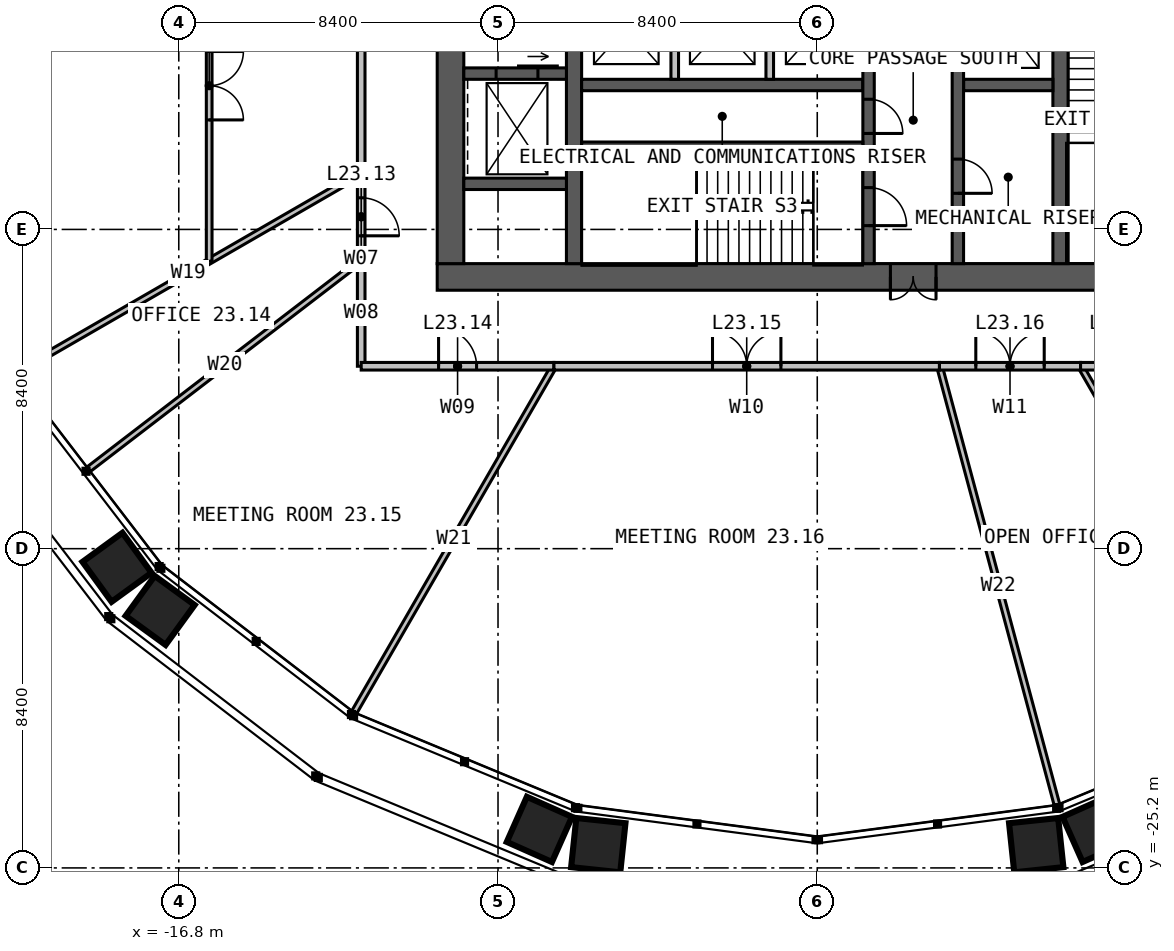
"""IFC4 building model, lengths in metres.
Left out: names, types, materials, properties, quantities, classifications, styles, units other than length and angle.
Written with IfcOpenShell. Run it as: python <this file> out.ifc"""

import sys

from ifc_helpers import new_model, si_unit, direction, frame, frame_2d, origin, place, context, subcontext, project, spatial, rectangle, extrude, element, fill, save


model = new_model("IFC4")
c1 = context("Model", 3, precision=1e-05, world=origin(), true_north=direction((0.0, 1.0)))
c2 = subcontext(c1, "Body", "Model", "MODEL_VIEW")
j1 = project(units=[si_unit("LENGTHUNIT", "METRE"), si_unit("PLANEANGLEUNIT", "RADIAN")], contexts=[c1])
p1 = place(None, origin())
s1 = spatial("IfcSite", under=j1, at=p1, CompositionType="ELEMENT")
p2 = place(p1, origin())
s2 = spatial("IfcBuilding", under=s1, at=p2, CompositionType="ELEMENT")
p3 = place(p2, frame((0.0, 0.0, 98.0)))
s3 = spatial("IfcBuildingStorey", under=s2, at=p3, CompositionType="ELEMENT", Elevation=98.0)
p4 = place(p3, frame((10.0, -9.65, 0.0), z_axis=(0.0, 0.0, 1.0), x_axis=(-1.0, 0.0, 0.0)))
e1 = element("IfcWall", 1, at=p4, inside=s3, PredefinedType="SOLIDWALL", context=c2, shape_type="SweptSolid", body=[
    extrude(rectangle(XDim=20.0, YDim=0.7, at=frame_2d((10.0, 0.0))), origin(), (0.0, 0.0, 1.0), 4.0),
])
p5 = place(p4, frame((6.875, 0.0, 0.0)))
e2 = element("IfcOpeningElement", 2, at=p5, cuts=e1, PredefinedType="OPENING", context=c2, shape_type="SweptSolid", body=[
    extrude(rectangle(XDim=1.2, YDim=2.2, at=frame_2d((0.6, 1.1))), frame((0.0, 0.36, 0.0), z_axis=(0.0, -1.0, 0.0), x_axis=(1.0, 0.0, 0.0)), (0.0, 0.0, 1.0), 0.72),
])
p6 = place(p3, frame((-9.65, 9.3, 0.0), z_axis=(0.0, 0.0, 1.0), x_axis=(0.0, -1.0, 0.0)))
e3 = element("IfcWall", 3, at=p6, inside=s3, PredefinedType="SOLIDWALL", context=c2, shape_type="SweptSolid", body=[
    extrude(rectangle(XDim=18.6, YDim=0.7, at=frame_2d((9.3, 0.0))), origin(), (0.0, 0.0, 1.0), 4.0),
])
p7 = place(p3, frame((-6.4, -9.3, 0.0), z_axis=(0.0, 0.0, 1.0), x_axis=(0.0, 1.0, 0.0)))
e4 = element("IfcWall", 4, at=p7, inside=s3, PredefinedType="SOLIDWALL", context=c2, shape_type="SweptSolid", body=[
    extrude(rectangle(XDim=18.6, YDim=0.4, at=frame_2d((9.3, 0.0))), origin(), (0.0, 0.0, 1.0), 4.0),
])
p8 = place(p7, frame((8.8, 0.0, 0.0)))
e5 = element("IfcOpeningElement", 5, at=p8, cuts=e4, PredefinedType="OPENING", context=c2, shape_type="SweptSolid", body=[
    extrude(rectangle(XDim=1.0, YDim=2.2, at=frame_2d((0.5, 1.1))), frame((0.0, 0.21, 0.0), z_axis=(0.0, -1.0, 0.0), x_axis=(1.0, 0.0, 0.0)), (0.0, 0.0, 1.0), 0.42),
])
p9 = place(p3, frame((6.4, 9.3, 0.0), z_axis=(0.0, 0.0, 1.0), x_axis=(0.0, -1.0, 0.0)))
e6 = element("IfcWall", 6, at=p9, inside=s3, PredefinedType="SOLIDWALL", context=c2, shape_type="SweptSolid", body=[
    extrude(rectangle(XDim=18.6, YDim=0.4, at=frame_2d((9.3, 0.0))), origin(), (0.0, 0.0, 1.0), 4.0),
])
p10 = place(p9, frame((8.8, 0.0, 0.0)))
e7 = element("IfcOpeningElement", 7, at=p10, cuts=e6, PredefinedType="OPENING", context=c2, shape_type="SweptSolid", body=[
    extrude(rectangle(XDim=1.0, YDim=2.2, at=frame_2d((0.5, 1.1))), frame((0.0, 0.21, 0.0), z_axis=(0.0, -1.0, 0.0), x_axis=(1.0, 0.0, 0.0)), (0.0, 0.0, 1.0), 0.42),
])
p11 = place(p3, frame((-6.2, -4.6, 0.0), z_axis=(0.0, 0.0, 1.0), x_axis=(1.0, 0.0, 0.0)))
e8 = element("IfcWall", 8, at=p11, inside=s3, PredefinedType="SOLIDWALL", context=c2, shape_type="SweptSolid", body=[
    extrude(rectangle(XDim=7.4, YDim=0.3, at=frame_2d((3.7, 0.0))), origin(), (0.0, 0.0, 1.0), 4.0),
])
p12 = place(p3, frame((3.85, -4.6, 0.0), z_axis=(0.0, 0.0, 1.0), x_axis=(1.0, 0.0, 0.0)))
e9 = element("IfcWall", 9, at=p12, inside=s3, PredefinedType="SOLIDWALL", context=c2, shape_type="SweptSolid", body=[
    extrude(rectangle(XDim=2.35, YDim=0.3, at=frame_2d((1.175, 0.0))), origin(), (0.0, 0.0, 1.0), 4.0),
])
p13 = place(p3, frame((1.35, -1.45, 0.0), z_axis=(0.0, 0.0, 1.0), x_axis=(0.0, -1.0, 0.0)))
e10 = element("IfcWall", 10, at=p13, inside=s3, PredefinedType="SOLIDWALL", context=c2, shape_type="SweptSolid", body=[
    extrude(rectangle(XDim=7.85, YDim=0.3, at=frame_2d((3.925, 0.0))), origin(), (0.0, 0.0, 1.0), 4.0),
])
p14 = place(p13, frame((5.85, 0.0, 0.0)))
e11 = element("IfcOpeningElement", 11, at=p14, cuts=e10, PredefinedType="OPENING", context=c2, shape_type="SweptSolid", body=[
    extrude(rectangle(XDim=1.0, YDim=2.2, at=frame_2d((0.5, 1.1))), frame((0.0, 0.16, 0.0), z_axis=(0.0, -1.0, 0.0), x_axis=(1.0, 0.0, 0.0)), (0.0, 0.0, 1.0), 0.32),
])
p15 = place(p13, frame((3.525, 0.0, 0.0)))
e12 = element("IfcOpeningElement", 12, at=p15, cuts=e10, PredefinedType="OPENING", context=c2, shape_type="SweptSolid", body=[
    extrude(rectangle(XDim=0.9, YDim=2.2, at=frame_2d((0.45, 1.1))), frame((0.0, 0.16, 0.0), z_axis=(0.0, -1.0, 0.0), x_axis=(1.0, 0.0, 0.0)), (0.0, 0.0, 1.0), 0.32),
])
p16 = place(p3, frame((3.7, -1.45, 0.0), z_axis=(0.0, 0.0, 1.0), x_axis=(0.0, -1.0, 0.0)))
e13 = element("IfcWall", 13, at=p16, inside=s3, PredefinedType="SOLIDWALL", context=c2, shape_type="SweptSolid", body=[
    extrude(rectangle(XDim=7.85, YDim=0.3, at=frame_2d((3.925, 0.0))), origin(), (0.0, 0.0, 1.0), 4.0),
])
p17 = place(p16, frame((5.1, 0.0, 0.0)))
e14 = element("IfcOpeningElement", 14, at=p17, cuts=e13, PredefinedType="OPENING", context=c2, shape_type="SweptSolid", body=[
    extrude(rectangle(XDim=0.9, YDim=2.2, at=frame_2d((0.45, 1.1))), frame((0.0, 0.16, 0.0), z_axis=(0.0, -1.0, 0.0), x_axis=(1.0, 0.0, 0.0)), (0.0, 0.0, 1.0), 0.32),
])
p18 = place(p3, frame((-6.2, -6.2, 0.0), z_axis=(0.0, 0.0, 1.0), x_axis=(1.0, 0.0, 0.0)))
e15 = element("IfcWall", 15, at=p18, inside=s3, PredefinedType="SOLIDWALL", context=c2, shape_type="SweptSolid", body=[
    extrude(rectangle(XDim=7.4, YDim=0.2, at=frame_2d((3.7, 0.0))), origin(), (0.0, 0.0, 1.0), 4.0),
])
p19 = place(p3, frame((-9.3, -4.3, 0.0), z_axis=(0.0, 0.0, 1.0), x_axis=(1.0, 0.0, 0.0)))
e16 = element("IfcWall", 16, at=p19, inside=s3, PredefinedType="SOLIDWALL", context=c2, shape_type="SweptSolid", body=[
    extrude(rectangle(XDim=2.7, YDim=0.3, at=frame_2d((1.35, 0.0))), origin(), (0.0, 0.0, 1.0), 4.0),
])
p20 = place(p19, frame((0.85, 0.0, 0.0)))
e17 = element("IfcOpeningElement", 17, at=p20, cuts=e16, PredefinedType="OPENING", context=c2, shape_type="SweptSolid", body=[
    extrude(rectangle(XDim=1.1, YDim=2.2, at=frame_2d((0.55, 1.1))), frame((0.0, 0.16, 0.0), z_axis=(0.0, -1.0, 0.0), x_axis=(1.0, 0.0, 0.0)), (0.0, 0.0, 1.0), 0.32),
])
p21 = place(p3, frame((-9.3, -7.2, 0.0), z_axis=(0.0, 0.0, 1.0), x_axis=(1.0, 0.0, 0.0)))
e18 = element("IfcWall", 18, at=p21, inside=s3, PredefinedType="SOLIDWALL", context=c2, shape_type="SweptSolid", body=[
    extrude(rectangle(XDim=2.7, YDim=0.3, at=frame_2d((1.35, 0.0))), origin(), (0.0, 0.0, 1.0), 4.0),
])
for number, where, z_axis, x_axis in (
    (19, (-3.75, -1.75, 0.0), (0.0, 0.0, 1.0), (0.0, -1.0, 0.0)),
    (20, (-1.25, -1.75, 0.0), (0.0, 0.0, 1.0), (0.0, -1.0, 0.0)),
):
    element("IfcWall", number, at=place(p3, frame(where, z_axis=z_axis, x_axis=x_axis)), inside=s3, PredefinedType="SOLIDWALL", context=c2, shape_type="SweptSolid", body=[
        extrude(rectangle(XDim=2.7, YDim=0.2, at=frame_2d((1.35, 0.0))), origin(), (0.0, 0.0, 1.0), 3.75),
    ])
p22 = place(p3, frame((-12.0, -6.928, 0.0), z_axis=(0.0, 0.0, 1.0), x_axis=(-0.866028201971, -0.499995153367, 0.0)))
e21 = element("IfcWall", 21, at=p22, inside=s3, PredefinedType="PARTITIONING", context=c2, shape_type="SweptSolid", body=[
    extrude(rectangle(XDim=10.514, YDim=0.15, at=frame_2d((5.257, 0.0))), origin(), (0.0, 0.0, 1.0), 2.79),
])
p23 = place(p3, frame((-12.0, -9.208, 0.0), z_axis=(0.0, 0.0, 1.0), x_axis=(-0.793353631913, -0.60876104896, 0.0)))
e22 = element("IfcWall", 22, at=p23, inside=s3, PredefinedType="PARTITIONING", context=c2, shape_type="SweptSolid", body=[
    extrude(rectangle(XDim=9.036, YDim=0.15, at=frame_2d((4.518, 0.0))), origin(), (0.0, 0.0, 1.0), 2.79),
])
p24 = place(p3, frame((-6.928, -12.0, 0.0), z_axis=(0.0, 0.0, 1.0), x_axis=(-0.499995153367, -0.866028201971, 0.0)))
e23 = element("IfcWall", 23, at=p24, inside=s3, PredefinedType="PARTITIONING", context=c2, shape_type="SweptSolid", body=[
    extrude(rectangle(XDim=10.514, YDim=0.15, at=frame_2d((5.257, 0.0))), origin(), (0.0, 0.0, 1.0), 2.79),
])
p25 = place(p3, frame((3.215, -12.0, 0.0), z_axis=(0.0, 0.0, 1.0), x_axis=(0.258816099716, -0.965926615498, 0.0)))
e24 = element("IfcWall", 24, at=p25, inside=s3, PredefinedType="PARTITIONING", context=c2, shape_type="SweptSolid", body=[
    extrude(rectangle(XDim=11.947, YDim=0.15, at=frame_2d((5.973, 0.0))), origin(), (0.0, 0.0, 1.0), 2.79),
])
p26 = place(p3, frame((6.928, -12.0, 0.0), z_axis=(0.0, 0.0, 1.0), x_axis=(0.499995153367, -0.866028201971, 0.0)))
e25 = element("IfcWall", 25, at=p26, inside=s3, PredefinedType="PARTITIONING", context=c2, shape_type="SweptSolid", body=[
    extrude(rectangle(XDim=10.514, YDim=0.15, at=frame_2d((5.257, 0.0))), origin(), (0.0, 0.0, 1.0), 2.79),
])
p27 = place(p3, frame((-16.0, 9.238, 0.0), z_axis=(0.0, 0.0, 1.0), x_axis=(0.0, -1.0, 0.0)))
e26 = element("IfcWall", 26, at=p27, inside=s3, PredefinedType="PARTITIONING", context=c2, shape_type="SweptSolid", body=[
    extrude(rectangle(XDim=18.475, YDim=0.15, at=frame_2d((9.238, 0.0))), origin(), (0.0, 0.0, 1.0), 2.79),
])
p28 = place(p27, frame((3.066, 0.0, 0.0)))
e27 = element("IfcOpeningElement", 27, at=p28, cuts=e26, PredefinedType="OPENING", context=c2, shape_type="SweptSolid", body=[
    extrude(rectangle(XDim=1.0, YDim=2.2, at=frame_2d((0.5, 1.1))), frame((0.0, 0.085, 0.0), z_axis=(0.0, -1.0, 0.0), x_axis=(1.0, 0.0, 0.0)), (0.0, 0.0, 1.0), 0.17),
])
p29 = place(p27, frame((7.684, 0.0, 0.0)))
e28 = element("IfcOpeningElement", 28, at=p29, cuts=e26, PredefinedType="OPENING", context=c2, shape_type="SweptSolid", body=[
    extrude(rectangle(XDim=1.0, YDim=2.2, at=frame_2d((0.5, 1.1))), frame((0.0, 0.085, 0.0), z_axis=(0.0, -1.0, 0.0), x_axis=(1.0, 0.0, 0.0)), (0.0, 0.0, 1.0), 0.17),
])
p30 = place(p27, frame((12.956, 0.0, 0.0)))
e29 = element("IfcOpeningElement", 29, at=p30, cuts=e26, PredefinedType="OPENING", context=c2, shape_type="SweptSolid", body=[
    extrude(rectangle(XDim=1.8, YDim=2.2, at=frame_2d((0.9, 1.1))), frame((0.0, 0.085, 0.0), z_axis=(0.0, -1.0, 0.0), x_axis=(1.0, 0.0, 0.0)), (0.0, 0.0, 1.0), 0.17),
])
p31 = place(p3, frame((-12.0, 6.928, 0.0), z_axis=(0.0, 0.0, 1.0), x_axis=(0.0, -1.0, 0.0)))
e30 = element("IfcWall", 30, at=p31, inside=s3, PredefinedType="PARTITIONING", context=c2, shape_type="SweptSolid", body=[
    extrude(rectangle(XDim=13.856, YDim=0.2, at=frame_2d((6.928, 0.0))), origin(), (0.0, 0.0, 1.0), 3.8),
])
p32 = place(p31, frame((6.028, 0.0, 0.0)))
e31 = element("IfcOpeningElement", 31, at=p32, cuts=e30, PredefinedType="OPENING", context=c2, shape_type="SweptSolid", body=[
    extrude(rectangle(XDim=1.8, YDim=2.2, at=frame_2d((0.9, 1.1))), frame((0.0, 0.11, 0.0), z_axis=(0.0, -1.0, 0.0), x_axis=(1.0, 0.0, 0.0)), (0.0, 0.0, 1.0), 0.22),
])
p33 = place(p3, frame((-12.0, -6.928, 0.0), z_axis=(0.0, 0.0, 1.0), x_axis=(0.0, -1.0, 0.0)))
e32 = element("IfcWall", 32, at=p33, inside=s3, PredefinedType="PARTITIONING", context=c2, shape_type="SweptSolid", body=[
    extrude(rectangle(XDim=2.28, YDim=0.2, at=frame_2d((1.14, 0.0))), origin(), (0.0, 0.0, 1.0), 3.8),
])
p34 = place(p33, frame((0.64, 0.0, 0.0)))
e33 = element("IfcOpeningElement", 33, at=p34, cuts=e32, PredefinedType="OPENING", context=c2, shape_type="SweptSolid", body=[
    extrude(rectangle(XDim=1.0, YDim=2.2, at=frame_2d((0.5, 1.1))), frame((0.0, 0.11, 0.0), z_axis=(0.0, -1.0, 0.0), x_axis=(1.0, 0.0, 0.0)), (0.0, 0.0, 1.0), 0.22),
])
p35 = place(p3, frame((-12.0, -9.208, 0.0), z_axis=(0.0, 0.0, 1.0), x_axis=(0.0, -1.0, 0.0)))
e34 = element("IfcWall", 34, at=p35, inside=s3, PredefinedType="PARTITIONING", context=c2, shape_type="SweptSolid", body=[
    extrude(rectangle(XDim=2.792, YDim=0.2, at=frame_2d((1.396, 0.0))), origin(), (0.0, 0.0, 1.0), 3.8),
])
p36 = place(p3, frame((-12.0, -12.0, 0.0), z_axis=(0.0, 0.0, 1.0), x_axis=(1.0, 0.0, 0.0)))
e35 = element("IfcWall", 35, at=p36, inside=s3, PredefinedType="PARTITIONING", context=c2, shape_type="SweptSolid", body=[
    extrude(rectangle(XDim=5.072, YDim=0.2, at=frame_2d((2.536, 0.0))), origin(), (0.0, 0.0, 1.0), 3.8),
])
p37 = place(p36, frame((2.036, 0.0, 0.0)))
e36 = element("IfcOpeningElement", 36, at=p37, cuts=e35, PredefinedType="OPENING", context=c2, shape_type="SweptSolid", body=[
    extrude(rectangle(XDim=1.0, YDim=2.2, at=frame_2d((0.5, 1.1))), frame((0.0, 0.11, 0.0), z_axis=(0.0, -1.0, 0.0), x_axis=(1.0, 0.0, 0.0)), (0.0, 0.0, 1.0), 0.22),
])
p38 = place(p3, frame((-6.928, -12.0, 0.0), z_axis=(0.0, 0.0, 1.0), x_axis=(1.0, 0.0, 0.0)))
e37 = element("IfcWall", 37, at=p38, inside=s3, PredefinedType="PARTITIONING", context=c2, shape_type="SweptSolid", body=[
    extrude(rectangle(XDim=10.144, YDim=0.2, at=frame_2d((5.072, 0.0))), origin(), (0.0, 0.0, 1.0), 3.8),
])
p39 = place(p38, frame((4.172, 0.0, 0.0)))
e38 = element("IfcOpeningElement", 38, at=p39, cuts=e37, PredefinedType="OPENING", context=c2, shape_type="SweptSolid", body=[
    extrude(rectangle(XDim=1.8, YDim=2.2, at=frame_2d((0.9, 1.1))), frame((0.0, 0.11, 0.0), z_axis=(0.0, -1.0, 0.0), x_axis=(1.0, 0.0, 0.0)), (0.0, 0.0, 1.0), 0.22),
])
p40 = place(p3, frame((3.215, -12.0, 0.0), z_axis=(0.0, 0.0, 1.0), x_axis=(1.0, 0.0, 0.0)))
e39 = element("IfcWall", 39, at=p40, inside=s3, PredefinedType="PARTITIONING", context=c2, shape_type="SweptSolid", body=[
    extrude(rectangle(XDim=3.713, YDim=0.2, at=frame_2d((1.856, 0.0))), origin(), (0.0, 0.0, 1.0), 3.8),
])
p41 = place(p40, frame((0.956, 0.0, 0.0)))
e40 = element("IfcOpeningElement", 40, at=p41, cuts=e39, PredefinedType="OPENING", context=c2, shape_type="SweptSolid", body=[
    extrude(rectangle(XDim=1.8, YDim=2.2, at=frame_2d((0.9, 1.1))), frame((0.0, 0.11, 0.0), z_axis=(0.0, -1.0, 0.0), x_axis=(1.0, 0.0, 0.0)), (0.0, 0.0, 1.0), 0.22),
])
p42 = place(p3, frame((6.928, -12.0, 0.0), z_axis=(0.0, 0.0, 1.0), x_axis=(1.0, 0.0, 0.0)))
e41 = element("IfcWall", 41, at=p42, inside=s3, PredefinedType="PARTITIONING", context=c2, shape_type="SweptSolid", body=[
    extrude(rectangle(XDim=2.28, YDim=0.2, at=frame_2d((1.14, 0.0))), origin(), (0.0, 0.0, 1.0), 3.8),
])
p43 = place(p42, frame((0.64, 0.0, 0.0)))
e42 = element("IfcOpeningElement", 42, at=p43, cuts=e41, PredefinedType="OPENING", context=c2, shape_type="SweptSolid", body=[
    extrude(rectangle(XDim=1.0, YDim=2.2, at=frame_2d((0.5, 1.1))), frame((0.0, 0.11, 0.0), z_axis=(0.0, -1.0, 0.0), x_axis=(1.0, 0.0, 0.0)), (0.0, 0.0, 1.0), 0.22),
])
p44 = place(p5, origin())
e43 = element("IfcDoor", 43, at=p44, inside=s3, OperationType="DOUBLE_DOOR_SINGLE_SWING", PredefinedType="DOOR", context=c2, shape_type="SweptSolid", body=[
    extrude(rectangle(XDim=1.2, YDim=2.2, at=frame_2d((0.6, 1.1))), frame((0.0, 0.025, 0.0), z_axis=(0.0, -1.0, 0.0), x_axis=(1.0, 0.0, 0.0)), (0.0, 0.0, 1.0), 0.05),
])
fill(e2, e43)
p45 = place(p14, origin())
e44 = element("IfcDoor", 44, at=p45, inside=s3, OperationType="SINGLE_SWING_RIGHT", PredefinedType="DOOR", context=c2, shape_type="SweptSolid", body=[
    extrude(rectangle(XDim=1.0, YDim=2.2, at=frame_2d((0.5, 1.1))), frame((0.0, 0.025, 0.0), z_axis=(0.0, -1.0, 0.0), x_axis=(1.0, 0.0, 0.0)), (0.0, 0.0, 1.0), 0.05),
])
fill(e11, e44)
p46 = place(p15, origin())
e45 = element("IfcDoor", 45, at=p46, inside=s3, OperationType="SINGLE_SWING_RIGHT", PredefinedType="DOOR", context=c2, shape_type="SweptSolid", body=[
    extrude(rectangle(XDim=0.9, YDim=2.2, at=frame_2d((0.45, 1.1))), frame((0.0, 0.025, 0.0), z_axis=(0.0, -1.0, 0.0), x_axis=(1.0, 0.0, 0.0)), (0.0, 0.0, 1.0), 0.05),
])
fill(e12, e45)
p47 = place(p17, origin())
e46 = element("IfcDoor", 46, at=p47, inside=s3, OperationType="SINGLE_SWING_RIGHT", PredefinedType="DOOR", context=c2, shape_type="SweptSolid", body=[
    extrude(rectangle(XDim=0.9, YDim=2.2, at=frame_2d((0.45, 1.1))), frame((0.0, 0.025, 0.0), z_axis=(0.0, -1.0, 0.0), x_axis=(1.0, 0.0, 0.0)), (0.0, 0.0, 1.0), 0.05),
])
fill(e14, e46)
p48 = place(p20, origin())
e47 = element("IfcDoor", 47, at=p48, inside=s3, OperationType="SLIDING_TO_LEFT", PredefinedType="DOOR", context=c2, shape_type="SweptSolid", body=[
    extrude(rectangle(XDim=1.1, YDim=2.2, at=frame_2d((0.55, 1.1))), frame((0.0, 0.025, 0.0), z_axis=(0.0, -1.0, 0.0), x_axis=(1.0, 0.0, 0.0)), (0.0, 0.0, 1.0), 0.05),
])
fill(e17, e47)
p49 = place(p30, origin())
e48 = element("IfcDoor", 48, at=p49, inside=s3, OperationType="DOUBLE_DOOR_SINGLE_SWING", PredefinedType="DOOR", context=c2, shape_type="SweptSolid", body=[
    extrude(rectangle(XDim=1.8, YDim=2.2, at=frame_2d((0.9, 1.1))), frame((0.0, 0.025, 0.0), z_axis=(0.0, -1.0, 0.0), x_axis=(1.0, 0.0, 0.0)), (0.0, 0.0, 1.0), 0.05),
])
fill(e29, e48)
p50 = place(p34, origin())
e49 = element("IfcDoor", 49, at=p50, inside=s3, OperationType="SINGLE_SWING_RIGHT", PredefinedType="DOOR", context=c2, shape_type="SweptSolid", body=[
    extrude(rectangle(XDim=1.0, YDim=2.2, at=frame_2d((0.5, 1.1))), frame((0.0, 0.025, 0.0), z_axis=(0.0, -1.0, 0.0), x_axis=(1.0, 0.0, 0.0)), (0.0, 0.0, 1.0), 0.05),
])
fill(e33, e49)
p51 = place(p37, origin())
e50 = element("IfcDoor", 50, at=p51, inside=s3, OperationType="SINGLE_SWING_LEFT", PredefinedType="DOOR", context=c2, shape_type="SweptSolid", body=[
    extrude(rectangle(XDim=1.0, YDim=2.2, at=frame_2d((0.5, 1.1))), frame((0.0, 0.025, 0.0), z_axis=(0.0, -1.0, 0.0), x_axis=(1.0, 0.0, 0.0)), (0.0, 0.0, 1.0), 0.05),
])
fill(e36, e50)
p52 = place(p39, origin())
e51 = element("IfcDoor", 51, at=p52, inside=s3, OperationType="DOUBLE_DOOR_SINGLE_SWING", PredefinedType="DOOR", context=c2, shape_type="SweptSolid", body=[
    extrude(rectangle(XDim=1.8, YDim=2.2, at=frame_2d((0.9, 1.1))), frame((0.0, 0.025, 0.0), z_axis=(0.0, -1.0, 0.0), x_axis=(1.0, 0.0, 0.0)), (0.0, 0.0, 1.0), 0.05),
])
fill(e38, e51)
p53 = place(p41, origin())
e52 = element("IfcDoor", 52, at=p53, inside=s3, OperationType="DOUBLE_DOOR_SINGLE_SWING", PredefinedType="DOOR", context=c2, shape_type="SweptSolid", body=[
    extrude(rectangle(XDim=1.8, YDim=2.2, at=frame_2d((0.9, 1.1))), frame((0.0, 0.025, 0.0), z_axis=(0.0, -1.0, 0.0), x_axis=(1.0, 0.0, 0.0)), (0.0, 0.0, 1.0), 0.05),
])
fill(e40, e52)
save(model, sys.argv[1])
